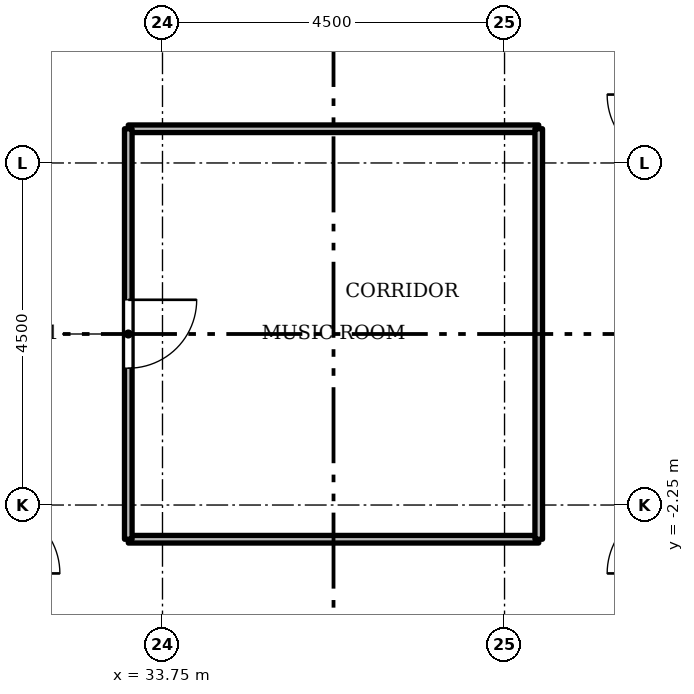
"""IFC4 building model, lengths in metres.
Left out: names, types, materials, properties, quantities, classifications, styles, units other than length and angle.
Written with IfcOpenShell. Run it as: python <this file> out.ifc"""

import sys

from ifc_helpers import new_model, si_unit, direction, frame, frame_2d, origin, place, context, subcontext, project, spatial, rectangle, extrude, element, fill, save


model = new_model("IFC4")
c1 = context("Model", 3, precision=1e-05, world=origin(), true_north=direction((0.0, 1.0)))
c2 = subcontext(c1, "Body", "Model", "MODEL_VIEW")
j1 = project(units=[si_unit("LENGTHUNIT", "METRE"), si_unit("PLANEANGLEUNIT", "RADIAN")], contexts=[c1])
p1 = place(None, origin())
s1 = spatial("IfcSite", under=j1, at=p1, CompositionType="ELEMENT")
p2 = place(p1, origin())
s2 = spatial("IfcBuilding", under=s1, at=p2, CompositionType="ELEMENT")
p3 = place(p2, frame((0.0, 0.0, 196.0)))
s3 = spatial("IfcBuildingStorey", under=s2, at=p3, CompositionType="ELEMENT", Elevation=196.0)
for number, where, z_axis, x_axis in (
    (1, (38.7, -2.7, 0.0), (0.0, 0.0, 1.0), (-1.0, 0.0, 0.0)),
    (2, (38.7, 2.7, 0.0), (0.0, 0.0, 1.0), (-1.0, 0.0, 0.0)),
    (3, (38.7, -2.7, 0.0), (0.0, 0.0, 1.0), (0.0, 1.0, 0.0)),
):
    element("IfcWall", number, at=place(p3, frame(where, z_axis=z_axis, x_axis=x_axis)), inside=s3, PredefinedType="PARTITIONING", context=c2, shape_type="SweptSolid", body=[
        extrude(rectangle(XDim=5.4, YDim=0.1, at=frame_2d((2.7, 0.0))), origin(), (0.0, 0.0, 1.0), 3.0),
    ])
p4 = place(p3, frame((33.3, -2.7, 0.0), z_axis=(0.0, 0.0, 1.0), x_axis=(0.0, 1.0, 0.0)))
e4 = element("IfcWall", 4, at=p4, inside=s3, PredefinedType="PARTITIONING", context=c2, shape_type="SweptSolid", body=[
    extrude(rectangle(XDim=5.4, YDim=0.1, at=frame_2d((2.7, 0.0))), origin(), (0.0, 0.0, 1.0), 3.0),
])
p5 = place(p4, frame((2.25, 0.0, 0.0)))
e5 = element("IfcOpeningElement", 5, at=p5, cuts=e4, PredefinedType="OPENING", context=c2, shape_type="SweptSolid", body=[
    extrude(rectangle(XDim=0.9, YDim=2.1, at=frame_2d((0.45, 1.05))), frame((0.0, 0.06, 0.0), z_axis=(0.0, -1.0, 0.0), x_axis=(1.0, 0.0, 0.0)), (0.0, 0.0, 1.0), 0.12),
])
p6 = place(p5, origin())
e6 = element("IfcDoor", 6, at=p6, inside=s3, OperationType="SINGLE_SWING_RIGHT", PredefinedType="DOOR", context=c2, shape_type="SweptSolid", body=[
    extrude(rectangle(XDim=0.9, YDim=2.1, at=frame_2d((0.45, 1.05))), frame((0.0, 0.025, 0.0), z_axis=(0.0, -1.0, 0.0), x_axis=(1.0, 0.0, 0.0)), (0.0, 0.0, 1.0), 0.05),
])
fill(e5, e6)
save(model, sys.argv[1])
